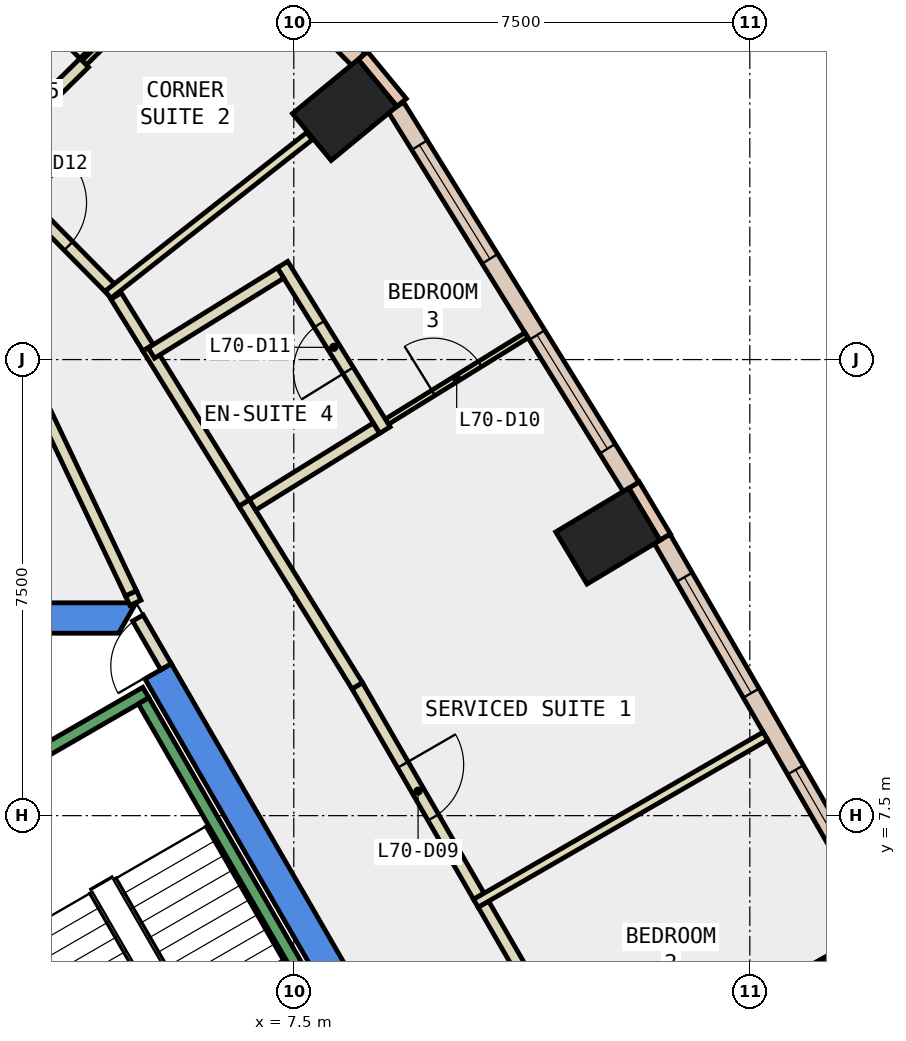
"""IFC4 building model, lengths in metres.
Left out: names, types, materials, properties, quantities, classifications, styles, units other than length and angle.
Written with IfcOpenShell. Run it as: python <this file> out.ifc"""

import sys

from ifc_helpers import new_model, si_unit, direction, frame, frame_2d, origin, origin_2d, place, context, subcontext, project, spatial, polyline, rectangle, outline, extrude, element, fill, save


model = new_model("IFC4")
c1 = context("Model", 3, precision=1e-05, world=origin(), true_north=direction((0.0, 1.0)))
c2 = subcontext(c1, "Body", "Model", "MODEL_VIEW")
j1 = project(units=[si_unit("LENGTHUNIT", "METRE"), si_unit("PLANEANGLEUNIT", "RADIAN")], contexts=[c1])
p1 = place(None, origin())
s1 = spatial("IfcSite", under=j1, at=p1, CompositionType="ELEMENT")
p2 = place(p1, origin())
s2 = spatial("IfcBuilding", under=s1, at=p2, CompositionType="ELEMENT")
p3 = place(p2, frame((0.0, 0.0, 300.8)))
s3 = spatial("IfcBuildingStorey", under=s2, at=p3, CompositionType="ELEMENT", Elevation=300.8)
for number, where, z_axis, x_axis in (
    (1, (16.809, 4.921, -0.34), (0.0, 0.0, 1.0), (-0.486, 0.874, 0.0)),
    (2, (12.666, 12.097, -0.34), (0.0, 0.0, 1.0), (-0.514, 0.858, 0.0)),
    (3, (8.337, 19.105, -0.34), (0.0, 0.0, 1.0), (-0.636, 0.772, 0.0)),
):
    element("IfcColumn", number, at=place(p3, frame(where, z_axis=z_axis, x_axis=x_axis)), inside=s3, PredefinedType="COLUMN", context=c2, shape_type="SweptSolid", body=[
        extrude(rectangle(XDim=1.0, YDim=1.4, at=origin_2d()), origin(), (0.0, 0.0, 1.0), 3.6),
    ])
p4 = place(p3, frame((0.0, 0.0, -0.34)))
e4 = element("IfcWall", 4, at=p4, inside=s3, PredefinedType="SHEAR", context=c2, shape_type="SweptSolid", body=[
    extrude(outline(polyline([(5.486, 9.998), (5.053, 9.748), (9.238, 2.5), (9.815, 2.5), (5.486, 9.998)])), origin(), (0.0, 0.0, 1.0), 3.6),
])
p5 = place(p3, frame((0.0, 0.0, -0.34)))
e5 = element("IfcWall", 5, at=p5, inside=s3, PredefinedType="SHEAR", context=c2, shape_type="SweptSolid", body=[
    extrude(outline(polyline([(4.907, 11.0), (-4.907, 11.0), (-4.619, 10.5), (4.619, 10.5), (4.907, 11.0)])), origin(), (0.0, 0.0, 1.0), 3.6),
])
p6 = place(p3, frame((13.609, 12.08, 0.0), z_axis=(0.0, 0.0, 1.0), x_axis=(-0.513885310016, 0.857858897576, 0.0)))
e6 = element("IfcWall", 6, at=p6, inside=s3, PredefinedType="STANDARD", context=c2, shape_type="SweptSolid", body=[
    extrude(rectangle(XDim=1.0, YDim=0.2, at=frame_2d((0.5, 0.0))), origin(), (0.0, 0.0, 1.0), 3.26),
])
p7 = place(p3, frame((9.273, 19.227, 0.0), z_axis=(0.0, 0.0, 1.0), x_axis=(-0.635852688617, 0.771810441999, 0.0)))
e7 = element("IfcWall", 7, at=p7, inside=s3, PredefinedType="STANDARD", context=c2, shape_type="SweptSolid", body=[
    extrude(rectangle(XDim=1.0, YDim=0.2, at=frame_2d((0.5, 0.0))), origin(), (0.0, 0.0, 1.0), 3.26),
])
p8 = place(p3, frame((17.215, 5.717, 0.0), z_axis=(0.0, 0.0, 1.0), x_axis=(-0.499905472729, 0.866079972252, 0.0)))
e8 = element("IfcWall", 8, at=p8, inside=s3, PredefinedType="STANDARD", context=c2, shape_type="SweptSolid", body=[
    extrude(rectangle(XDim=7.313, YDim=0.3, at=frame_2d((3.657, 0.0))), origin(), (0.0, 0.0, 1.0), 3.26),
])
p9 = place(p8, frame((0.728, 0.0, 0.9)))
e9 = element("IfcOpeningElement", 9, at=p9, cuts=e8, PredefinedType="OPENING", context=c2, shape_type="SweptSolid", body=[
    extrude(rectangle(XDim=2.2, YDim=2.0, at=frame_2d((1.1, 1.0))), frame((0.0, 0.16, 0.0), z_axis=(0.0, -1.0, 0.0), x_axis=(1.0, 0.0, 0.0)), (0.0, 0.0, 1.0), 0.32),
])
p10 = place(p8, frame((4.385, 0.0, 0.9)))
e10 = element("IfcOpeningElement", 10, at=p10, cuts=e8, PredefinedType="OPENING", context=c2, shape_type="SweptSolid", body=[
    extrude(rectangle(XDim=2.2, YDim=2.0, at=frame_2d((1.1, 1.0))), frame((0.0, 0.16, 0.0), z_axis=(0.0, -1.0, 0.0), x_axis=(1.0, 0.0, 0.0)), (0.0, 0.0, 1.0), 0.32),
])
p11 = place(p3, frame((13.047, 12.907, 0.0), z_axis=(0.0, 0.0, 1.0), x_axis=(-0.526409529565, 0.850231149267, 0.0)))
e11 = element("IfcWall", 11, at=p11, inside=s3, PredefinedType="STANDARD", context=c2, shape_type="SweptSolid", body=[
    extrude(rectangle(XDim=7.346, YDim=0.3, at=frame_2d((3.673, 0.0))), origin(), (0.0, 0.0, 1.0), 3.26),
])
p12 = place(p11, frame((0.737, 0.0, 0.9)))
e12 = element("IfcOpeningElement", 12, at=p12, cuts=e11, PredefinedType="OPENING", context=c2, shape_type="SweptSolid", body=[
    extrude(rectangle(XDim=2.2, YDim=2.0, at=frame_2d((1.1, 1.0))), frame((0.0, 0.16, 0.0), z_axis=(0.0, -1.0, 0.0), x_axis=(1.0, 0.0, 0.0)), (0.0, 0.0, 1.0), 0.32),
])
p13 = place(p11, frame((4.41, 0.0, 0.9)))
e13 = element("IfcOpeningElement", 13, at=p13, cuts=e11, PredefinedType="OPENING", context=c2, shape_type="SweptSolid", body=[
    extrude(rectangle(XDim=2.2, YDim=2.0, at=frame_2d((1.1, 1.0))), frame((0.0, 0.16, 0.0), z_axis=(0.0, -1.0, 0.0), x_axis=(1.0, 0.0, 0.0)), (0.0, 0.0, 1.0), 0.32),
])
p14 = place(p3, frame((8.564, 19.938, 0.0), z_axis=(0.0, 0.0, 1.0), x_axis=(-0.70250598769, 0.711677832491, 0.0)))
e14 = element("IfcWall", 14, at=p14, inside=s3, PredefinedType="STANDARD", context=c2, shape_type="SweptSolid", body=[
    extrude(rectangle(XDim=4.259, YDim=0.3, at=frame_2d((2.129, 0.0))), origin(), (0.0, 0.0, 1.0), 3.26),
])
p15 = place(p14, frame((1.429, 0.0, 0.9)))
e15 = element("IfcOpeningElement", 15, at=p15, cuts=e14, PredefinedType="OPENING", context=c2, shape_type="SweptSolid", body=[
    extrude(rectangle(XDim=1.4, YDim=2.0, at=frame_2d((0.7, 1.0))), frame((0.0, 0.16, 0.0), z_axis=(0.0, -1.0, 0.0), x_axis=(1.0, 0.0, 0.0)), (0.0, 0.0, 1.0), 0.32),
])
p16 = place(p3, frame((4.896, 11.0, 0.0), z_axis=(0.0, 0.0, 1.0), x_axis=(-0.428451014387, 0.903565010539, 0.0)))
e16 = element("IfcWall", 16, at=p16, inside=s3, PredefinedType="PARTITIONING", context=c2, shape_type="SweptSolid", body=[
    extrude(rectangle(XDim=0.173, YDim=0.2, at=frame_2d((0.086, 0.0))), origin(), (0.0, 0.0, 1.0), 2.4),
])
p17 = place(p3, frame((10.618, 6.044, 0.0), z_axis=(0.0, 0.0, 1.0), x_axis=(0.50008212199, -0.86597798544, 0.0)))
e17 = element("IfcWall", 17, at=p17, inside=s3, PredefinedType="PARTITIONING", context=c2, shape_type="SweptSolid", body=[
    extrude(rectangle(XDim=3.995, YDim=0.2, at=frame_2d((1.998, 0.0))), origin(), (0.0, 0.0, 1.0), 3.26),
])
p18 = place(p3, frame((6.683, 12.642, 0.0), z_axis=(0.0, 0.0, 1.0), x_axis=(0.526290465295, -0.850304854825, 0.0)))
e18 = element("IfcWall", 18, at=p18, inside=s3, PredefinedType="PARTITIONING", context=c2, shape_type="SweptSolid", body=[
    extrude(rectangle(XDim=3.538, YDim=0.2, at=frame_2d((1.769, 0.0))), origin(), (0.0, 0.0, 1.0), 3.26),
])
p19 = place(p3, frame((8.545, 9.634, 0.0), z_axis=(0.0, 0.0, 1.0), x_axis=(0.50008212199, -0.86597798544, 0.0)))
e19 = element("IfcWall", 19, at=p19, inside=s3, PredefinedType="PARTITIONING", context=c2, shape_type="SweptSolid", body=[
    extrude(rectangle(XDim=3.995, YDim=0.2, at=frame_2d((1.998, 0.0))), origin(), (0.0, 0.0, 1.0), 3.26),
])
p20 = place(p19, frame((1.498, 0.0, 0.0)))
e20 = element("IfcOpeningElement", 20, at=p20, cuts=e19, PredefinedType="OPENING", context=c2, shape_type="SweptSolid", body=[
    extrude(rectangle(XDim=1.0, YDim=2.1, at=frame_2d((0.5, 1.05))), frame((0.0, 0.11, 0.0), z_axis=(0.0, -1.0, 0.0), x_axis=(1.0, 0.0, 0.0)), (0.0, 0.0, 1.0), 0.22),
])
p21 = place(p3, frame((4.577, 16.045, 0.0), z_axis=(0.0, 0.0, 1.0), x_axis=(0.526203576349, -0.850358628014, 0.0)))
e21 = element("IfcWall", 21, at=p21, inside=s3, PredefinedType="PARTITIONING", context=c2, shape_type="SweptSolid", body=[
    extrude(rectangle(XDim=1.002, YDim=0.2, at=frame_2d((0.501, 0.0))), origin(), (0.0, 0.0, 1.0), 3.26),
])
p22 = place(p3, frame((5.104, 15.193, 0.0), z_axis=(0.0, 0.0, 1.0), x_axis=(0.526329401671, -0.850280754184, 0.0)))
e22 = element("IfcWall", 22, at=p22, inside=s3, PredefinedType="PARTITIONING", context=c2, shape_type="SweptSolid", body=[
    extrude(rectangle(XDim=3.0, YDim=0.2, at=frame_2d((1.5, 0.0))), origin(), (0.0, 0.0, 1.0), 3.26),
])
p23 = place(p3, frame((2.346, 18.336, 0.0), z_axis=(0.0, 0.0, 1.0), x_axis=(0.702481985573, -0.711701524479, 0.0)))
e23 = element("IfcWall", 23, at=p23, inside=s3, PredefinedType="PARTITIONING", context=c2, shape_type="SweptSolid", body=[
    extrude(rectangle(XDim=3.125, YDim=0.2, at=frame_2d((1.562, 0.0))), origin(), (0.0, 0.0, 1.0), 3.26),
])
p24 = place(p23, frame((1.062, 0.0, 0.0)))
e24 = element("IfcOpeningElement", 24, at=p24, cuts=e23, PredefinedType="OPENING", context=c2, shape_type="SweptSolid", body=[
    extrude(rectangle(XDim=1.0, YDim=2.1, at=frame_2d((0.5, 1.05))), frame((0.0, 0.11, 0.0), z_axis=(0.0, -1.0, 0.0), x_axis=(1.0, 0.0, 0.0)), (0.0, 0.0, 1.0), 0.22),
])
p25 = place(p3, frame((10.494, 6.059, 0.0), z_axis=(0.0, 0.0, 1.0), x_axis=(0.866027397988, 0.499996545922, 0.0)))
e25 = element("IfcWall", 25, at=p25, inside=s3, PredefinedType="PARTITIONING", context=c2, shape_type="SweptSolid", body=[
    extrude(rectangle(XDim=5.5, YDim=0.15, at=frame_2d((2.75, 0.0))), origin(), (0.0, 0.0, 1.0), 3.26),
])
p26 = place(p3, frame((9.031, 13.979, 0.0), z_axis=(0.0, 0.0, 1.0), x_axis=(0.85032680557, 0.526254998768, 0.0)))
e26 = element("IfcWall", 26, at=p26, inside=s3, PredefinedType="PARTITIONING", context=c2, shape_type="SweptSolid", body=[
    extrude(rectangle(XDim=2.7, YDim=0.1, at=frame_2d((1.35, 0.0))), origin(), (0.0, 0.0, 1.0), 3.26),
])
p27 = place(p26, frame((0.9, 0.0, 0.0)))
e27 = element("IfcOpeningElement", 27, at=p27, cuts=e26, PredefinedType="OPENING", context=c2, shape_type="SweptSolid", body=[
    extrude(rectangle(XDim=0.9, YDim=2.1, at=frame_2d((0.45, 1.05))), frame((0.0, 0.06, 0.0), z_axis=(0.0, -1.0, 0.0), x_axis=(1.0, 0.0, 0.0)), (0.0, 0.0, 1.0), 0.12),
])
p28 = place(p3, frame((6.821, 12.61, 0.0), z_axis=(0.0, 0.0, 1.0), x_axis=(0.850254303895, 0.526372129494, 0.0)))
e28 = element("IfcWall", 28, at=p28, inside=s3, PredefinedType="PARTITIONING", context=c2, shape_type="SweptSolid", body=[
    extrude(rectangle(XDim=2.399, YDim=0.2, at=frame_2d((1.2, 0.0))), origin(), (0.0, 0.0, 1.0), 3.26),
])
p29 = place(p3, frame((8.999, 13.841, 0.0), z_axis=(0.0, 0.0, 1.0), x_axis=(-0.526283695852, 0.850309044689, 0.0)))
e29 = element("IfcWall", 29, at=p29, inside=s3, PredefinedType="PARTITIONING", context=c2, shape_type="SweptSolid", body=[
    extrude(rectangle(XDim=3.2, YDim=0.2, at=frame_2d((1.6, 0.0))), origin(), (0.0, 0.0, 1.0), 3.26),
])
p30 = place(p29, frame((1.15, 0.0, 0.0)))
e30 = element("IfcOpeningElement", 30, at=p30, cuts=e29, PredefinedType="OPENING", context=c2, shape_type="SweptSolid", body=[
    extrude(rectangle(XDim=0.9, YDim=2.1, at=frame_2d((0.45, 1.05))), frame((0.0, 0.11, 0.0), z_axis=(0.0, -1.0, 0.0), x_axis=(1.0, 0.0, 0.0)), (0.0, 0.0, 1.0), 0.22),
])
p31 = place(p3, frame((7.282, 16.424, 0.0), z_axis=(0.0, 0.0, 1.0), x_axis=(-0.850142312258, -0.526552987751, 0.0)))
e31 = element("IfcWall", 31, at=p31, inside=s3, PredefinedType="PARTITIONING", context=c2, shape_type="SweptSolid", body=[
    extrude(rectangle(XDim=2.5, YDim=0.2, at=frame_2d((1.25, 0.0))), origin(), (0.0, 0.0, 1.0), 3.26),
])
p32 = place(p3, frame((4.445, 16.068, 0.0), z_axis=(0.0, 0.0, 1.0), x_axis=(0.785872006963, 0.618389188677, 0.0)))
e32 = element("IfcWall", 32, at=p32, inside=s3, PredefinedType="PARTITIONING", context=c2, shape_type="SweptSolid", body=[
    extrude(rectangle(XDim=4.216, YDim=0.15, at=frame_2d((2.108, 0.0))), origin(), (0.0, 0.0, 1.0), 3.26),
])
p33 = place(p3, frame((4.053, 19.881, 0.0), z_axis=(0.0, 0.0, 1.0), x_axis=(0.711776071152, 0.702406452516, 0.0)))
e33 = element("IfcWall", 33, at=p33, inside=s3, PredefinedType="PARTITIONING", context=c2, shape_type="SweptSolid", body=[
    extrude(rectangle(XDim=3.101, YDim=0.1, at=frame_2d((1.55, 0.0))), origin(), (0.0, 0.0, 1.0), 3.26),
])
p34 = place(p33, frame((1.1, 0.0, 0.0)))
e34 = element("IfcOpeningElement", 34, at=p34, cuts=e33, PredefinedType="OPENING", context=c2, shape_type="SweptSolid", body=[
    extrude(rectangle(XDim=0.9, YDim=2.1, at=frame_2d((0.45, 1.05))), frame((0.0, 0.06, 0.0), z_axis=(0.0, -1.0, 0.0), x_axis=(1.0, 0.0, 0.0)), (0.0, 0.0, 1.0), 0.12),
])
p35 = place(p3, frame((2.416, 18.265, 0.0), z_axis=(0.0, 0.0, 1.0), x_axis=(0.71207765541, 0.702100714047, 0.0)))
e35 = element("IfcWall", 35, at=p35, inside=s3, PredefinedType="PARTITIONING", context=c2, shape_type="SweptSolid", body=[
    extrude(rectangle(XDim=2.3, YDim=0.2, at=frame_2d((1.15, 0.0))), origin(), (0.0, 0.0, 1.0), 3.26),
])
p36 = place(p3, frame((4.054, 20.022, 0.0), z_axis=(0.0, 0.0, 1.0), x_axis=(-0.702351102688, 0.711830688123, 0.0)))
e36 = element("IfcWall", 36, at=p36, inside=s3, PredefinedType="PARTITIONING", context=c2, shape_type="SweptSolid", body=[
    extrude(rectangle(XDim=1.7, YDim=0.2, at=frame_2d((0.85, 0.0))), origin(), (0.0, 0.0, 1.0), 3.26),
])
p37 = place(p3, frame((5.399, 9.948, 0.0), z_axis=(0.0, 0.0, 1.0), x_axis=(-0.499882215713, 0.866093395895, 0.0)))
e37 = element("IfcWall", 37, at=p37, inside=s3, PredefinedType="PARTITIONING", context=c2, shape_type="SweptSolid", body=[
    extrude(rectangle(XDim=0.926, YDim=0.2, at=frame_2d((0.463, 0.0))), origin(), (0.0, 0.0, 1.0), 2.4),
])
p38 = place(p37, frame((0.017, 0.0, 0.0)))
e38 = element("IfcOpeningElement", 38, at=p38, cuts=e37, PredefinedType="OPENING", context=c2, shape_type="SweptSolid", body=[
    extrude(rectangle(XDim=0.9, YDim=2.1, at=frame_2d((0.45, 1.05))), frame((0.0, 0.11, 0.0), z_axis=(0.0, -1.0, 0.0), x_axis=(1.0, 0.0, 0.0)), (0.0, 0.0, 1.0), 0.22),
])
p39 = place(p3, frame((4.822, 11.156, 0.0), z_axis=(0.0, 0.0, 1.0), x_axis=(-0.429057973289, 0.903276953961, 0.0)))
e39 = element("IfcWall", 39, at=p39, inside=s3, PredefinedType="PARTITIONING", context=c2, shape_type="SweptSolid", body=[
    extrude(rectangle(XDim=4.298, YDim=0.2, at=frame_2d((2.149, 0.0))), origin(), (0.0, 0.0, 1.0), 3.26),
])
p40 = place(p3, frame((2.7, 8.158, 0.0), z_axis=(0.0, 0.0, 1.0), x_axis=(0.86611865017, 0.499838457731, 0.0)))
e40 = element("IfcWall", 40, at=p40, inside=s3, PredefinedType="STANDARD", context=c2, shape_type="SweptSolid", body=[
    extrude(rectangle(XDim=2.733, YDim=0.2, at=frame_2d((1.366, 0.0))), origin(), (0.0, 0.0, 1.0), 3.26),
])
p41 = place(p3, frame((4.843, 1.312, 0.0), z_axis=(0.0, 0.0, 1.0), x_axis=(-0.499963383562, 0.866046543262, 0.0)))
e41 = element("IfcWall", 41, at=p41, inside=s3, PredefinedType="STANDARD", context=c2, shape_type="SweptSolid", body=[
    extrude(rectangle(XDim=6.9, YDim=0.2, at=frame_2d((3.45, 0.0))), origin(), (0.0, 0.0, 1.0), 3.26),
])
p42 = place(p41, frame((0.45, 0.0, 0.0)))
e42 = element("IfcOpeningElement", 42, at=p42, cuts=e41, PredefinedType="OPENING", context=c2, shape_type="SweptSolid", body=[
    extrude(rectangle(XDim=1.1, YDim=2.2, at=frame_2d((0.55, 1.1))), frame((0.0, 0.11, 0.0), z_axis=(0.0, -1.0, 0.0), x_axis=(1.0, 0.0, 0.0)), (0.0, 0.0, 1.0), 0.22),
])
p43 = place(p3, frame((8.48, 3.412, 0.0), z_axis=(0.0, 0.0, 1.0), x_axis=(-0.499978703459, 0.866037698999, 0.0)))
e43 = element("IfcWall", 43, at=p43, inside=s3, PredefinedType="STANDARD", context=c2, shape_type="SweptSolid", body=[
    extrude(rectangle(XDim=6.9, YDim=0.2, at=frame_2d((3.45, 0.0))), origin(), (0.0, 0.0, 1.0), 3.26),
])
p44 = place(p9, origin())
e44 = element("IfcWindow", 44, at=p44, inside=s3, PartitioningType="SINGLE_PANEL", PredefinedType="WINDOW", context=c2, shape_type="SweptSolid", body=[
    extrude(rectangle(XDim=2.2, YDim=2.0, at=frame_2d((1.1, 1.0))), frame((0.0, 0.03, 0.0), z_axis=(0.0, -1.0, 0.0), x_axis=(1.0, 0.0, 0.0)), (0.0, 0.0, 1.0), 0.06),
])
fill(e9, e44)
p45 = place(p10, origin())
e45 = element("IfcWindow", 45, at=p45, inside=s3, PartitioningType="SINGLE_PANEL", PredefinedType="WINDOW", context=c2, shape_type="SweptSolid", body=[
    extrude(rectangle(XDim=2.2, YDim=2.0, at=frame_2d((1.1, 1.0))), frame((0.0, 0.03, 0.0), z_axis=(0.0, -1.0, 0.0), x_axis=(1.0, 0.0, 0.0)), (0.0, 0.0, 1.0), 0.06),
])
fill(e10, e45)
p46 = place(p12, origin())
e46 = element("IfcWindow", 46, at=p46, inside=s3, PartitioningType="SINGLE_PANEL", PredefinedType="WINDOW", context=c2, shape_type="SweptSolid", body=[
    extrude(rectangle(XDim=2.2, YDim=2.0, at=frame_2d((1.1, 1.0))), frame((0.0, 0.03, 0.0), z_axis=(0.0, -1.0, 0.0), x_axis=(1.0, 0.0, 0.0)), (0.0, 0.0, 1.0), 0.06),
])
fill(e12, e46)
p47 = place(p13, origin())
e47 = element("IfcWindow", 47, at=p47, inside=s3, PartitioningType="SINGLE_PANEL", PredefinedType="WINDOW", context=c2, shape_type="SweptSolid", body=[
    extrude(rectangle(XDim=2.2, YDim=2.0, at=frame_2d((1.1, 1.0))), frame((0.0, 0.03, 0.0), z_axis=(0.0, -1.0, 0.0), x_axis=(1.0, 0.0, 0.0)), (0.0, 0.0, 1.0), 0.06),
])
fill(e13, e47)
p48 = place(p20, origin())
e48 = element("IfcDoor", 48, at=p48, inside=s3, OperationType="SINGLE_SWING_LEFT", PredefinedType="DOOR", context=c2, shape_type="SweptSolid", body=[
    extrude(rectangle(XDim=1.0, YDim=2.1, at=frame_2d((0.5, 1.05))), frame((0.0, 0.025, 0.0), z_axis=(0.0, -1.0, 0.0), x_axis=(1.0, 0.0, 0.0)), (0.0, 0.0, 1.0), 0.05),
])
fill(e20, e48)
p49 = place(p27, origin())
e49 = element("IfcDoor", 49, at=p49, inside=s3, OperationType="SINGLE_SWING_LEFT", PredefinedType="DOOR", context=c2, shape_type="SweptSolid", body=[
    extrude(rectangle(XDim=0.9, YDim=2.1, at=frame_2d((0.45, 1.05))), frame((0.0, 0.025, 0.0), z_axis=(0.0, -1.0, 0.0), x_axis=(1.0, 0.0, 0.0)), (0.0, 0.0, 1.0), 0.05),
])
fill(e27, e49)
p50 = place(p30, origin())
e50 = element("IfcDoor", 50, at=p50, inside=s3, OperationType="SINGLE_SWING_RIGHT", PredefinedType="DOOR", context=c2, shape_type="SweptSolid", body=[
    extrude(rectangle(XDim=0.9, YDim=2.1, at=frame_2d((0.45, 1.05))), frame((0.0, 0.025, 0.0), z_axis=(0.0, -1.0, 0.0), x_axis=(1.0, 0.0, 0.0)), (0.0, 0.0, 1.0), 0.05),
])
fill(e30, e50)
p51 = place(p24, origin())
e51 = element("IfcDoor", 51, at=p51, inside=s3, OperationType="SINGLE_SWING_LEFT", PredefinedType="DOOR", context=c2, shape_type="SweptSolid", body=[
    extrude(rectangle(XDim=1.0, YDim=2.1, at=frame_2d((0.5, 1.05))), frame((0.0, 0.025, 0.0), z_axis=(0.0, -1.0, 0.0), x_axis=(1.0, 0.0, 0.0)), (0.0, 0.0, 1.0), 0.05),
])
fill(e24, e51)
p52 = place(p38, origin())
e52 = element("IfcDoor", 52, at=p52, inside=s3, OperationType="SINGLE_SWING_LEFT", PredefinedType="DOOR", context=c2, shape_type="SweptSolid", body=[
    extrude(rectangle(XDim=0.9, YDim=2.1, at=frame_2d((0.45, 1.05))), frame((0.0, 0.025, 0.0), z_axis=(0.0, -1.0, 0.0), x_axis=(1.0, 0.0, 0.0)), (0.0, 0.0, 1.0), 0.05),
])
fill(e38, e52)
save(model, sys.argv[1])
